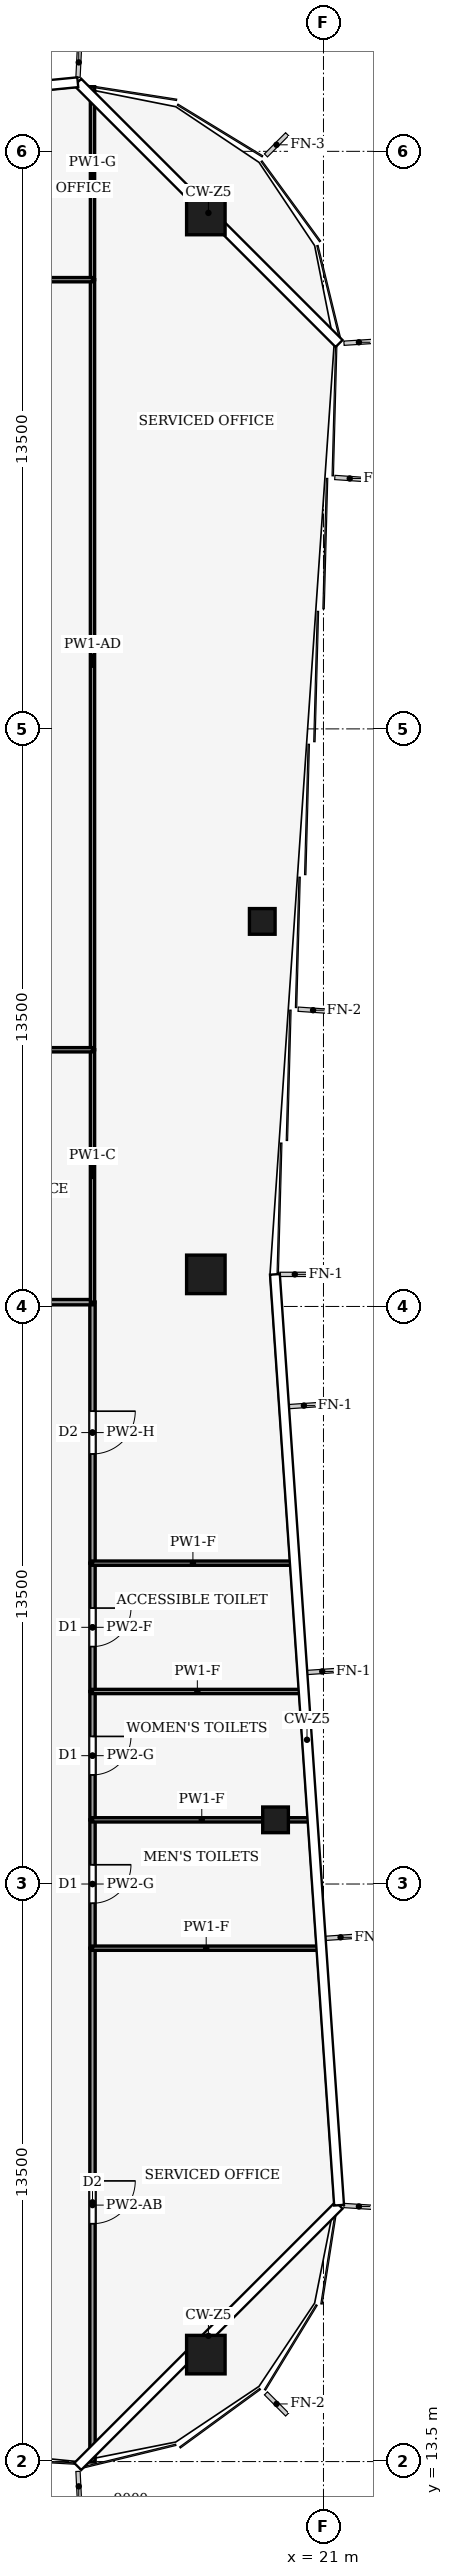
"""IFC4 building model, lengths in metres.
Left out: names, types, materials, properties, quantities, classifications, styles, units other than length and angle.
Written with IfcOpenShell. Run it as: python <this file> out.ifc"""

import sys

from ifc_helpers import new_model, si_unit, direction, frame, frame_2d, origin, origin_2d, place, context, subcontext, project, spatial, rectangle, hollow_rectangle, extrude, element, fill, save


model = new_model("IFC4")
c1 = context("Model", 3, precision=1e-05, world=origin(), true_north=direction((0.0, 1.0)))
c2 = subcontext(c1, "Body", "Model", "MODEL_VIEW")
j1 = project(units=[si_unit("LENGTHUNIT", "METRE"), si_unit("PLANEANGLEUNIT", "RADIAN")], contexts=[c1])
p1 = place(None, origin())
s1 = spatial("IfcSite", under=j1, at=p1, CompositionType="ELEMENT")
p2 = place(p1, origin())
s2 = spatial("IfcBuilding", under=s1, at=p2, CompositionType="ELEMENT")
p3 = place(p2, frame((0.0, 0.0, 294.0)))
s3 = spatial("IfcBuildingStorey", under=s2, at=p3, CompositionType="ELEMENT", Elevation=294.0)
for number, where, z_axis, x_axis in (
    (1, (18.25, 66.0, 0.0), (0.0, 0.0, 1.0), (1.0, 0.0, 0.0)),
    (2, (18.25, 41.25, 0.0), (0.0, 0.0, 1.0), (1.0, 0.0, 0.0)),
    (3, (18.25, 16.0, 0.0), (0.0, 0.0, 1.0), (1.0, 0.0, 0.0)),
):
    element("IfcColumn", number, at=place(p3, frame(where, z_axis=z_axis, x_axis=x_axis)), inside=s3, PredefinedType="COLUMN", context=c2, shape_type="SweptSolid", body=[
        extrude(hollow_rectangle(XDim=0.9, YDim=0.9, WallThickness=0.04, at=origin_2d()), origin(), (0.0, 0.0, 1.0), 4.0),
    ])
for number, where, z_axis, x_axis in (
    (4, (19.879, 28.5, 0.0), (0.0, 0.0, 1.0), (1.0, 0.0, 0.0)),
    (5, (19.569, 49.5, 0.0), (0.0, 0.0, 1.0), (1.0, 0.0, 0.0)),
):
    element("IfcColumn", number, at=place(p3, frame(where, z_axis=z_axis, x_axis=x_axis)), inside=s3, PredefinedType="COLUMN", context=c2, shape_type="SweptSolid", body=[
        extrude(hollow_rectangle(XDim=0.6, YDim=0.6, WallThickness=0.025, at=origin_2d()), origin(), (0.0, 0.0, 1.0), 4.0),
    ])
p4 = place(p3, frame((15.6, 25.5, 0.0), z_axis=(0.0, 0.0, 1.0), x_axis=(0.0, -1.0, 0.0)))
e6 = element("IfcWall", 6, at=p4, inside=s3, PredefinedType="PARTITIONING", context=c2, shape_type="SweptSolid", body=[
    extrude(rectangle(XDim=12.01, YDim=0.125, at=frame_2d((6.005, 0.0))), origin(), (0.0, 0.0, 1.0), 2.93),
])
p5 = place(p4, frame((5.44, 0.0, 0.0)))
e7 = element("IfcOpeningElement", 7, at=p5, cuts=e6, PredefinedType="OPENING", context=c2, shape_type="SweptSolid", body=[
    extrude(rectangle(XDim=1.0, YDim=2.1, at=frame_2d((0.5, 1.05))), frame((0.0, 0.073, 0.0), z_axis=(0.0, -1.0, 0.0), x_axis=(1.0, 0.0, 0.0)), (0.0, 0.0, 1.0), 0.145),
])
p6 = place(p3, frame((15.6, 28.5, 0.0), z_axis=(0.0, 0.0, 1.0), x_axis=(0.0, -1.0, 0.0)))
e8 = element("IfcWall", 8, at=p6, inside=s3, PredefinedType="PARTITIONING", context=c2, shape_type="SweptSolid", body=[
    extrude(rectangle(XDim=3.0, YDim=0.125, at=frame_2d((1.5, 0.0))), origin(), (0.0, 0.0, 1.0), 3.87),
])
p7 = place(p6, frame((1.05, 0.0, 0.0)))
e9 = element("IfcOpeningElement", 9, at=p7, cuts=e8, PredefinedType="OPENING", context=c2, shape_type="SweptSolid", body=[
    extrude(rectangle(XDim=0.9, YDim=2.1, at=frame_2d((0.45, 1.05))), frame((0.0, 0.073, 0.0), z_axis=(0.0, -1.0, 0.0), x_axis=(1.0, 0.0, 0.0)), (0.0, 0.0, 1.0), 0.145),
])
p8 = place(p3, frame((15.6, 31.5, 0.0), z_axis=(0.0, 0.0, 1.0), x_axis=(0.0, -1.0, 0.0)))
e10 = element("IfcWall", 10, at=p8, inside=s3, PredefinedType="PARTITIONING", context=c2, shape_type="SweptSolid", body=[
    extrude(rectangle(XDim=3.0, YDim=0.125, at=frame_2d((1.5, 0.0))), origin(), (0.0, 0.0, 1.0), 3.87),
])
p9 = place(p8, frame((1.05, 0.0, 0.0)))
e11 = element("IfcOpeningElement", 11, at=p9, cuts=e10, PredefinedType="OPENING", context=c2, shape_type="SweptSolid", body=[
    extrude(rectangle(XDim=0.9, YDim=2.1, at=frame_2d((0.45, 1.05))), frame((0.0, 0.073, 0.0), z_axis=(0.0, -1.0, 0.0), x_axis=(1.0, 0.0, 0.0)), (0.0, 0.0, 1.0), 0.145),
])
p10 = place(p3, frame((15.6, 34.5, 0.0), z_axis=(0.0, 0.0, 1.0), x_axis=(0.0, -1.0, 0.0)))
e12 = element("IfcWall", 12, at=p10, inside=s3, PredefinedType="PARTITIONING", context=c2, shape_type="SweptSolid", body=[
    extrude(rectangle(XDim=3.0, YDim=0.125, at=frame_2d((1.5, 0.0))), origin(), (0.0, 0.0, 1.0), 3.54),
])
p11 = place(p10, frame((1.05, 0.0, 0.0)))
e13 = element("IfcOpeningElement", 13, at=p11, cuts=e12, PredefinedType="OPENING", context=c2, shape_type="SweptSolid", body=[
    extrude(rectangle(XDim=0.9, YDim=2.1, at=frame_2d((0.45, 1.05))), frame((0.0, 0.073, 0.0), z_axis=(0.0, -1.0, 0.0), x_axis=(1.0, 0.0, 0.0)), (0.0, 0.0, 1.0), 0.145),
])
p12 = place(p3, frame((15.6, 40.604, 0.0), z_axis=(0.0, 0.0, 1.0), x_axis=(0.0, -1.0, 0.0)))
e14 = element("IfcWall", 14, at=p12, inside=s3, PredefinedType="PARTITIONING", context=c2, shape_type="SweptSolid", body=[
    extrude(rectangle(XDim=6.104, YDim=0.125, at=frame_2d((3.052, 0.0))), origin(), (0.0, 0.0, 1.0), 3.14),
])
p13 = place(p12, frame((2.552, 0.0, 0.0)))
e15 = element("IfcOpeningElement", 15, at=p13, cuts=e14, PredefinedType="OPENING", context=c2, shape_type="SweptSolid", body=[
    extrude(rectangle(XDim=1.0, YDim=2.1, at=frame_2d((0.5, 1.05))), frame((0.0, 0.073, 0.0), z_axis=(0.0, -1.0, 0.0), x_axis=(1.0, 0.0, 0.0)), (0.0, 0.0, 1.0), 0.145),
])
p14 = place(p3, frame((9.0, 40.6, 0.0), z_axis=(0.0, 0.0, 1.0), x_axis=(1.0, 0.0, 0.0)))
e16 = element("IfcWall", 16, at=p14, inside=s3, PredefinedType="PARTITIONING", context=c2, shape_type="SweptSolid", body=[
    extrude(rectangle(XDim=6.6, YDim=0.125, at=frame_2d((3.3, 0.0))), origin(), (0.0, 0.0, 1.0), 3.39),
])
p15 = place(p14, frame((2.8, 0.0, 0.0)))
e17 = element("IfcOpeningElement", 17, at=p15, cuts=e16, PredefinedType="OPENING", context=c2, shape_type="SweptSolid", body=[
    extrude(rectangle(XDim=1.0, YDim=2.1, at=frame_2d((0.5, 1.05))), frame((0.0, 0.073, 0.0), z_axis=(0.0, -1.0, 0.0), x_axis=(1.0, 0.0, 0.0)), (0.0, 0.0, 1.0), 0.145),
])
p16 = place(p3, frame((20.916, 25.5, 0.0), z_axis=(0.0, 0.0, 1.0), x_axis=(-1.0, 0.0, 0.0)))
e18 = element("IfcWall", 18, at=p16, inside=s3, PredefinedType="PARTITIONING", context=c2, shape_type="SweptSolid", body=[
    extrude(rectangle(XDim=5.316, YDim=0.1, at=frame_2d((2.658, 0.0))), origin(), (0.0, 0.0, 1.0), 3.04),
])
p17 = place(p3, frame((20.709, 28.5, 0.0), z_axis=(0.0, 0.0, 1.0), x_axis=(-1.0, 0.0, 0.0)))
e19 = element("IfcWall", 19, at=p17, inside=s3, PredefinedType="PARTITIONING", context=c2, shape_type="SweptSolid", body=[
    extrude(rectangle(XDim=5.109, YDim=0.1, at=frame_2d((2.555, 0.0))), origin(), (0.0, 0.0, 1.0), 3.04),
])
p18 = place(p3, frame((20.502, 31.5, 0.0), z_axis=(0.0, 0.0, 1.0), x_axis=(-1.0, 0.0, 0.0)))
e20 = element("IfcWall", 20, at=p18, inside=s3, PredefinedType="PARTITIONING", context=c2, shape_type="SweptSolid", body=[
    extrude(rectangle(XDim=4.902, YDim=0.1, at=frame_2d((2.451, 0.0))), origin(), (0.0, 0.0, 1.0), 3.04),
])
p19 = place(p3, frame((20.295, 34.5, 0.0), z_axis=(0.0, 0.0, 1.0), x_axis=(-1.0, 0.0, 0.0)))
e21 = element("IfcWall", 21, at=p19, inside=s3, PredefinedType="PARTITIONING", context=c2, shape_type="SweptSolid", body=[
    extrude(rectangle(XDim=4.695, YDim=0.1, at=frame_2d((2.348, 0.0))), origin(), (0.0, 0.0, 1.0), 3.04),
])
p20 = place(p3, frame((15.6, 46.5, 0.0), z_axis=(0.0, 0.0, 1.0), x_axis=(0.0, -1.0, 0.0)))
e22 = element("IfcWall", 22, at=p20, inside=s3, PredefinedType="PARTITIONING", context=c2, shape_type="SweptSolid", body=[
    extrude(rectangle(XDim=5.9, YDim=0.1, at=frame_2d((2.95, 0.0))), origin(), (0.0, 0.0, 1.0), 3.87),
])
p21 = place(p3, frame((15.6, 64.5, 0.0), z_axis=(0.0, 0.0, 1.0), x_axis=(0.0, -1.0, 0.0)))
e23 = element("IfcWall", 23, at=p21, inside=s3, PredefinedType="PARTITIONING", context=c2, shape_type="SweptSolid", body=[
    extrude(rectangle(XDim=18.0, YDim=0.1, at=frame_2d((9.0, 0.0))), origin(), (0.0, 0.0, 1.0), 3.35),
])
p22 = place(p3, frame((15.6, 69.01, 0.0), z_axis=(0.0, 0.0, 1.0), x_axis=(0.0, -1.0, 0.0)))
e24 = element("IfcWall", 24, at=p22, inside=s3, PredefinedType="PARTITIONING", context=c2, shape_type="SweptSolid", body=[
    extrude(rectangle(XDim=4.51, YDim=0.1, at=frame_2d((2.255, 0.0))), origin(), (0.0, 0.0, 1.0), 2.93),
])
p23 = place(p3, frame((15.6, 46.5, 0.0), z_axis=(0.0, 0.0, 1.0), x_axis=(-1.0, 0.0, 0.0)))
e25 = element("IfcWall", 25, at=p23, inside=s3, PredefinedType="PARTITIONING", context=c2, shape_type="SweptSolid", body=[
    extrude(rectangle(XDim=6.604, YDim=0.1, at=frame_2d((3.302, 0.0))), origin(), (0.0, 0.0, 1.0), 3.39),
])
p24 = place(p3, frame((3.0, 64.5, 0.0), z_axis=(0.0, 0.0, 1.0), x_axis=(1.0, 0.0, 0.0)))
e26 = element("IfcWall", 26, at=p24, inside=s3, PredefinedType="PARTITIONING", context=c2, shape_type="SweptSolid", body=[
    extrude(rectangle(XDim=12.6, YDim=0.1, at=frame_2d((6.3, 0.0))), origin(), (0.0, 0.0, 1.0), 3.24),
])
p25 = place(p24, frame((5.8, 0.0, 0.0)))
e27 = element("IfcOpeningElement", 27, at=p25, cuts=e26, PredefinedType="OPENING", context=c2, shape_type="SweptSolid", body=[
    extrude(rectangle(XDim=1.0, YDim=2.1, at=frame_2d((0.5, 1.05))), frame((0.0, 0.06, 0.0), z_axis=(0.0, -1.0, 0.0), x_axis=(1.0, 0.0, 0.0)), (0.0, 0.0, 1.0), 0.12),
])
p26 = place(p5, origin())
e28 = element("IfcDoor", 28, at=p26, inside=s3, OperationType="SINGLE_SWING_LEFT", PredefinedType="DOOR", context=c2, shape_type="SweptSolid", body=[
    extrude(rectangle(XDim=1.0, YDim=2.1, at=frame_2d((0.5, 1.05))), frame((0.0, 0.025, 0.0), z_axis=(0.0, -1.0, 0.0), x_axis=(1.0, 0.0, 0.0)), (0.0, 0.0, 1.0), 0.05),
])
fill(e7, e28)
p27 = place(p7, origin())
e29 = element("IfcDoor", 29, at=p27, inside=s3, OperationType="SINGLE_SWING_LEFT", PredefinedType="DOOR", context=c2, shape_type="SweptSolid", body=[
    extrude(rectangle(XDim=0.9, YDim=2.1, at=frame_2d((0.45, 1.05))), frame((0.0, 0.025, 0.0), z_axis=(0.0, -1.0, 0.0), x_axis=(1.0, 0.0, 0.0)), (0.0, 0.0, 1.0), 0.05),
])
fill(e9, e29)
p28 = place(p9, origin())
e30 = element("IfcDoor", 30, at=p28, inside=s3, OperationType="SINGLE_SWING_RIGHT", PredefinedType="DOOR", context=c2, shape_type="SweptSolid", body=[
    extrude(rectangle(XDim=0.9, YDim=2.1, at=frame_2d((0.45, 1.05))), frame((0.0, 0.025, 0.0), z_axis=(0.0, -1.0, 0.0), x_axis=(1.0, 0.0, 0.0)), (0.0, 0.0, 1.0), 0.05),
])
fill(e11, e30)
p29 = place(p11, origin())
e31 = element("IfcDoor", 31, at=p29, inside=s3, OperationType="SINGLE_SWING_LEFT", PredefinedType="DOOR", context=c2, shape_type="SweptSolid", body=[
    extrude(rectangle(XDim=0.9, YDim=2.1, at=frame_2d((0.45, 1.05))), frame((0.0, 0.025, 0.0), z_axis=(0.0, -1.0, 0.0), x_axis=(1.0, 0.0, 0.0)), (0.0, 0.0, 1.0), 0.05),
])
fill(e13, e31)
p30 = place(p13, origin())
e32 = element("IfcDoor", 32, at=p30, inside=s3, OperationType="SINGLE_SWING_RIGHT", PredefinedType="DOOR", context=c2, shape_type="SweptSolid", body=[
    extrude(rectangle(XDim=1.0, YDim=2.1, at=frame_2d((0.5, 1.05))), frame((0.0, 0.025, 0.0), z_axis=(0.0, -1.0, 0.0), x_axis=(1.0, 0.0, 0.0)), (0.0, 0.0, 1.0), 0.05),
])
fill(e15, e32)
save(model, sys.argv[1])
